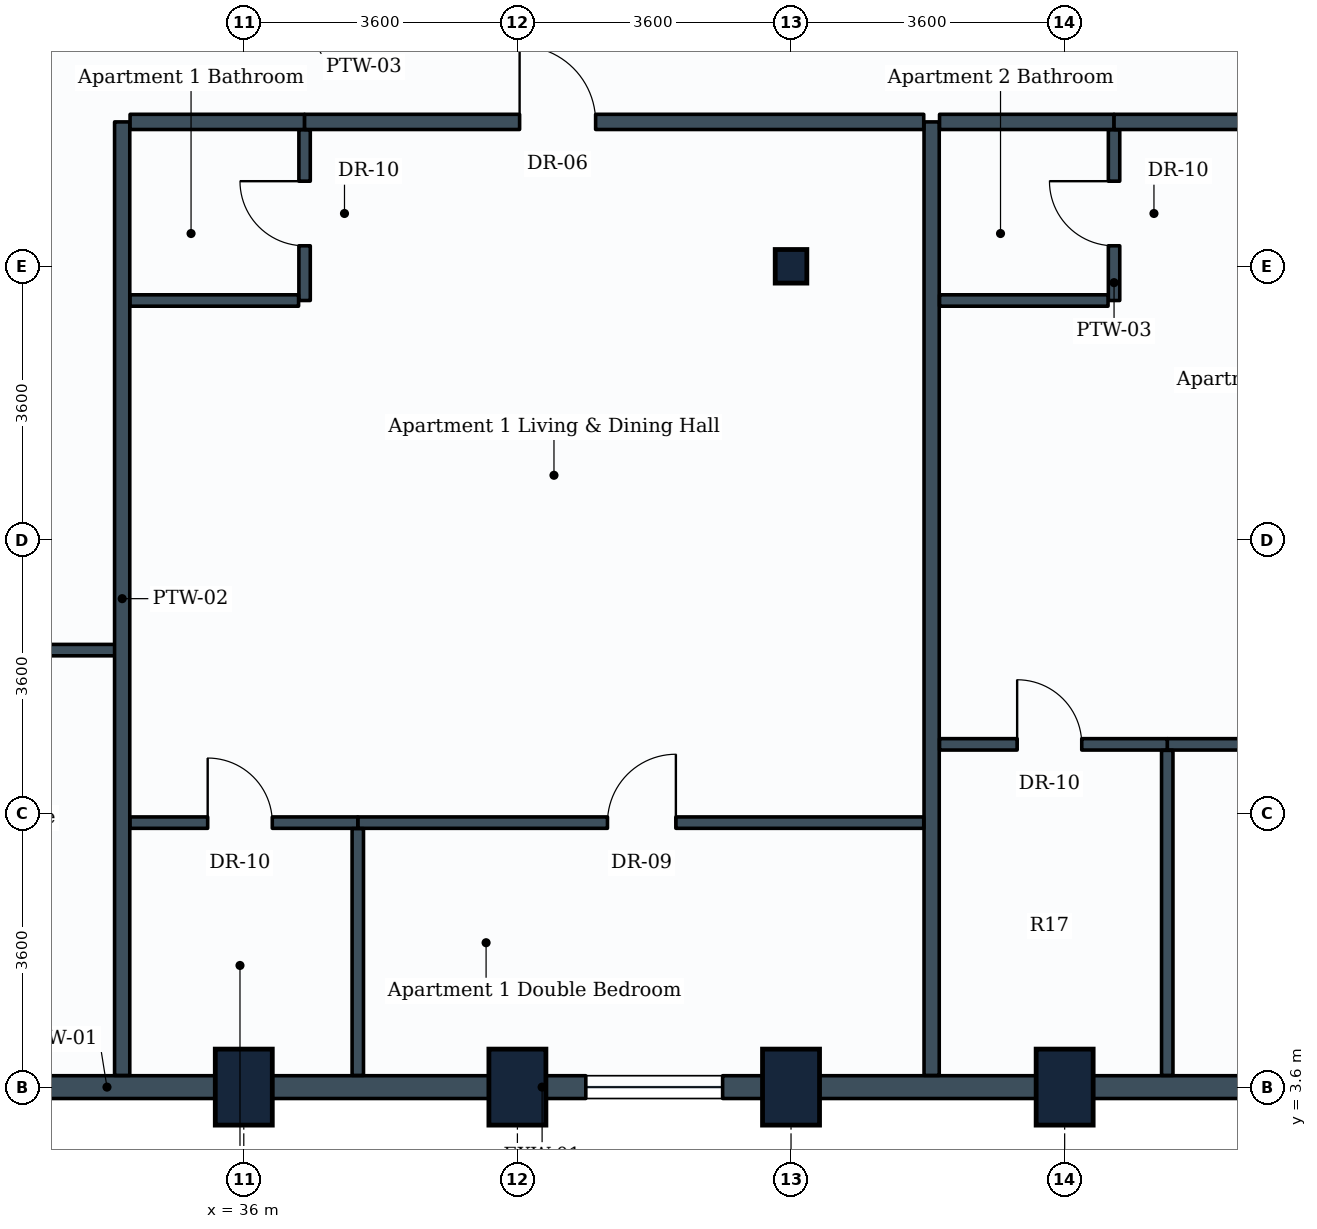
"""IFC4 building model, lengths in metres.
Left out: names, types, materials, properties, quantities, classifications, styles, units other than length and angle.
Written with IfcOpenShell. Run it as: python <this file> out.ifc"""

import sys

from ifc_helpers import new_model, si_unit, direction, frame, frame_2d, origin, origin_2d, place, context, subcontext, project, spatial, rectangle, i_section, extrude, element, fill, save


model = new_model("IFC4")
c1 = context("Model", 3, precision=1e-05, world=origin(), true_north=direction((0.0, 1.0)))
c2 = subcontext(c1, "Body", "Model", "MODEL_VIEW")
j1 = project(units=[si_unit("LENGTHUNIT", "METRE"), si_unit("PLANEANGLEUNIT", "RADIAN")], contexts=[c1])
p1 = place(None, origin())
s1 = spatial("IfcSite", under=j1, at=p1, CompositionType="ELEMENT")
p2 = place(p1, origin())
s2 = spatial("IfcBuilding", under=s1, at=p2, CompositionType="ELEMENT")
p3 = place(p2, frame((0.0, 0.0, 158.0)))
s3 = spatial("IfcBuildingStorey", under=s2, at=p3, CompositionType="ELEMENT", Elevation=158.0)
for number, where, z_axis, x_axis in (
    (1, (36.0, 3.6, 0.0), (0.0, 0.0, 1.0), (1.0, 0.0, 0.0)),
    (2, (39.6, 3.6, 0.0), (0.0, 0.0, 1.0), (1.0, 0.0, 0.0)),
    (3, (43.2, 3.6, 0.0), (0.0, 0.0, 1.0), (1.0, 0.0, 0.0)),
):
    element("IfcColumn", number, at=place(p3, frame(where, z_axis=z_axis, x_axis=x_axis)), inside=s3, PredefinedType="COLUMN", context=c2, shape_type="SweptSolid", body=[
        extrude(rectangle(XDim=0.75, YDim=1.0, at=origin_2d()), origin(), (0.0, 0.0, 1.0), 3.8),
    ])
p4 = place(p3, frame((43.2, 14.4, 0.0), z_axis=(0.0, 0.0, 1.0), x_axis=(1.0, 0.0, 0.0)))
e4 = element("IfcColumn", 4, at=p4, inside=s3, PredefinedType="COLUMN", context=c2, shape_type="SweptSolid", body=[
    extrude(i_section(OverallWidth=0.416, OverallDepth=0.442, WebThickness=0.025, FlangeThickness=0.041, FilletRadius=0.015, at=origin_2d()), origin(), (0.0, 0.0, 1.0), 3.8),
])
p5 = place(p3, frame((46.8, 3.6, 0.0), z_axis=(0.0, 0.0, 1.0), x_axis=(1.0, 0.0, 0.0)))
e5 = element("IfcColumn", 5, at=p5, inside=s3, PredefinedType="COLUMN", context=c2, shape_type="SweptSolid", body=[
    extrude(rectangle(XDim=0.75, YDim=1.0, at=origin_2d()), origin(), (0.0, 0.0, 1.0), 3.8),
])
for number, where, z_axis, x_axis in (
    (6, (36.0, 3.6, 0.0), (0.0, 0.0, 1.0), (-1.0, 0.0, 0.0)),
    (7, (39.6, 3.6, 0.0), (0.0, 0.0, 1.0), (-1.0, 0.0, 0.0)),
):
    element("IfcWall", number, at=place(p3, frame(where, z_axis=z_axis, x_axis=x_axis)), inside=s3, PredefinedType="STANDARD", context=c2, shape_type="SweptSolid", body=[
        extrude(rectangle(XDim=3.6, YDim=0.3, at=frame_2d((1.8, 0.0))), origin(), (0.0, 0.0, 1.0), 2.93),
    ])
p6 = place(p3, frame((43.2, 3.6, 0.0), z_axis=(0.0, 0.0, 1.0), x_axis=(-1.0, 0.0, 0.0)))
e8 = element("IfcWall", 8, at=p6, inside=s3, PredefinedType="STANDARD", context=c2, shape_type="SweptSolid", body=[
    extrude(rectangle(XDim=3.6, YDim=0.3, at=frame_2d((1.8, 0.0))), origin(), (0.0, 0.0, 1.0), 2.93),
])
p7 = place(p6, frame((0.9, 0.0, 0.85)))
e9 = element("IfcOpeningElement", 9, at=p7, cuts=e8, PredefinedType="OPENING", context=c2, shape_type="SweptSolid", body=[
    extrude(rectangle(XDim=1.8, YDim=1.35, at=frame_2d((0.9, 0.675))), frame((0.0, 0.16, 0.0), z_axis=(0.0, -1.0, 0.0), x_axis=(1.0, 0.0, 0.0)), (0.0, 0.0, 1.0), 0.32),
])
p8 = place(p3, frame((46.8, 3.6, 0.0), z_axis=(0.0, 0.0, 1.0), x_axis=(-1.0, 0.0, 0.0)))
e10 = element("IfcWall", 10, at=p8, inside=s3, PredefinedType="STANDARD", context=c2, shape_type="SweptSolid", body=[
    extrude(rectangle(XDim=3.6, YDim=0.3, at=frame_2d((1.8, 0.0))), origin(), (0.0, 0.0, 1.0), 2.93),
])
p9 = place(p3, frame((50.4, 3.6, 0.0), z_axis=(0.0, 0.0, 1.0), x_axis=(-1.0, 0.0, 0.0)))
e11 = element("IfcWall", 11, at=p9, inside=s3, PredefinedType="STANDARD", context=c2, shape_type="SweptSolid", body=[
    extrude(rectangle(XDim=3.6, YDim=0.3, at=frame_2d((1.8, 0.0))), origin(), (0.0, 0.0, 1.0), 2.93),
])
p10 = place(p3, frame((28.879, 9.35, 0.0), z_axis=(0.0, 0.0, 1.0), x_axis=(1.0, 0.0, 0.0)))
e12 = element("IfcWall", 12, at=p10, inside=s3, PredefinedType="PARTITIONING", context=c2, shape_type="SweptSolid", body=[
    extrude(rectangle(XDim=5.521, YDim=0.15, at=frame_2d((2.76, 0.0))), origin(), (0.0, 0.0, 1.0), 3.535),
])
p11 = place(p10, frame((0.36, 0.0, 0.0)))
e13 = element("IfcOpeningElement", 13, at=p11, cuts=e12, PredefinedType="OPENING", context=c2, shape_type="SweptSolid", body=[
    extrude(rectangle(XDim=1.0, YDim=2.1, at=frame_2d((0.5, 1.05))), frame((0.0, 0.085, 0.0), z_axis=(0.0, -1.0, 0.0), x_axis=(1.0, 0.0, 0.0)), (0.0, 0.0, 1.0), 0.17),
])
for number, where, z_axis, x_axis in (
    (14, (34.4, 3.754, 0.0), (0.0, 0.0, 1.0), (0.0, 1.0, 0.0)),
    (15, (45.05, 3.754, 0.0), (0.0, 0.0, 1.0), (0.0, 1.0, 0.0)),
):
    element("IfcWall", number, at=place(p3, frame(where, z_axis=z_axis, x_axis=x_axis)), inside=s3, PredefinedType="PARTITIONING", context=c2, shape_type="SweptSolid", body=[
        extrude(rectangle(XDim=12.546, YDim=0.2, at=frame_2d((6.273, 0.0))), origin(), (0.0, 0.0, 1.0), 2.93),
    ])
p12 = place(p3, frame((34.504, 16.3, 0.0), z_axis=(0.0, 0.0, 1.0), x_axis=(1.0, 0.0, 0.0)))
e16 = element("IfcWall", 16, at=p12, inside=s3, PredefinedType="PARTITIONING", context=c2, shape_type="SweptSolid", body=[
    extrude(rectangle(XDim=2.296, YDim=0.2, at=frame_2d((1.148, 0.0))), origin(), (0.0, 0.0, 1.0), 3.22),
])
p13 = place(p3, frame((36.8, 13.95, 0.0), z_axis=(0.0, 0.0, 1.0), x_axis=(0.0, 1.0, 0.0)))
e17 = element("IfcWall", 17, at=p13, inside=s3, PredefinedType="PARTITIONING", context=c2, shape_type="SweptSolid", body=[
    extrude(rectangle(XDim=2.246, YDim=0.15, at=frame_2d((1.123, 0.0))), origin(), (0.0, 0.0, 1.0), 3.17),
])
p14 = place(p13, frame((0.72, 0.0, 0.0)))
e18 = element("IfcOpeningElement", 18, at=p14, cuts=e17, PredefinedType="OPENING", context=c2, shape_type="SweptSolid", body=[
    extrude(rectangle(XDim=0.85, YDim=2.1, at=frame_2d((0.425, 1.05))), frame((0.0, 0.085, 0.0), z_axis=(0.0, -1.0, 0.0), x_axis=(1.0, 0.0, 0.0)), (0.0, 0.0, 1.0), 0.17),
])
p15 = place(p3, frame((34.504, 13.95, 0.0), z_axis=(0.0, 0.0, 1.0), x_axis=(1.0, 0.0, 0.0)))
e19 = element("IfcWall", 19, at=p15, inside=s3, PredefinedType="PARTITIONING", context=c2, shape_type="SweptSolid", body=[
    extrude(rectangle(XDim=2.217, YDim=0.15, at=frame_2d((1.108, 0.0))), origin(), (0.0, 0.0, 1.0), 3.22),
])
p16 = place(p3, frame((36.8, 16.3, 0.0), z_axis=(0.0, 0.0, 1.0), x_axis=(1.0, 0.0, 0.0)))
e20 = element("IfcWall", 20, at=p16, inside=s3, PredefinedType="PARTITIONING", context=c2, shape_type="SweptSolid", body=[
    extrude(rectangle(XDim=8.146, YDim=0.2, at=frame_2d((4.073, 0.0))), origin(), (0.0, 0.0, 1.0), 3.17),
])
p17 = place(p16, frame((2.829, 0.0, 0.0)))
e21 = element("IfcOpeningElement", 21, at=p17, cuts=e20, PredefinedType="OPENING", context=c2, shape_type="SweptSolid", body=[
    extrude(rectangle(XDim=1.0, YDim=2.1, at=frame_2d((0.5, 1.05))), frame((0.0, 0.11, 0.0), z_axis=(0.0, -1.0, 0.0), x_axis=(1.0, 0.0, 0.0)), (0.0, 0.0, 1.0), 0.22),
])
p18 = place(p3, frame((37.5, 7.08, 0.0), z_axis=(0.0, 0.0, 1.0), x_axis=(1.0, 0.0, 0.0)))
e22 = element("IfcWall", 22, at=p18, inside=s3, PredefinedType="PARTITIONING", context=c2, shape_type="SweptSolid", body=[
    extrude(rectangle(XDim=7.446, YDim=0.15, at=frame_2d((3.723, 0.0))), origin(), (0.0, 0.0, 1.0), 3.17),
])
p19 = place(p18, frame((3.285, 0.0, 0.0)))
e23 = element("IfcOpeningElement", 23, at=p19, cuts=e22, PredefinedType="OPENING", context=c2, shape_type="SweptSolid", body=[
    extrude(rectangle(XDim=0.9, YDim=2.1, at=frame_2d((0.45, 1.05))), frame((0.0, 0.085, 0.0), z_axis=(0.0, -1.0, 0.0), x_axis=(1.0, 0.0, 0.0)), (0.0, 0.0, 1.0), 0.17),
])
p20 = place(p3, frame((34.504, 7.08, 0.0), z_axis=(0.0, 0.0, 1.0), x_axis=(1.0, 0.0, 0.0)))
e24 = element("IfcWall", 24, at=p20, inside=s3, PredefinedType="PARTITIONING", context=c2, shape_type="SweptSolid", body=[
    extrude(rectangle(XDim=2.996, YDim=0.15, at=frame_2d((1.498, 0.0))), origin(), (0.0, 0.0, 1.0), 3.17),
])
p21 = place(p20, frame((1.021, 0.0, 0.0)))
e25 = element("IfcOpeningElement", 25, at=p21, cuts=e24, PredefinedType="OPENING", context=c2, shape_type="SweptSolid", body=[
    extrude(rectangle(XDim=0.85, YDim=2.1, at=frame_2d((0.425, 1.05))), frame((0.0, 0.085, 0.0), z_axis=(0.0, -1.0, 0.0), x_axis=(1.0, 0.0, 0.0)), (0.0, 0.0, 1.0), 0.17),
])
p22 = place(p3, frame((37.5, 3.754, 0.0), z_axis=(0.0, 0.0, 1.0), x_axis=(0.0, 1.0, 0.0)))
e26 = element("IfcWall", 26, at=p22, inside=s3, PredefinedType="PARTITIONING", context=c2, shape_type="SweptSolid", body=[
    extrude(rectangle(XDim=3.247, YDim=0.15, at=frame_2d((1.624, 0.0))), origin(), (0.0, 0.0, 1.0), 2.93),
])
p23 = place(p3, frame((45.154, 16.3, 0.0), z_axis=(0.0, 0.0, 1.0), x_axis=(1.0, 0.0, 0.0)))
e27 = element("IfcWall", 27, at=p23, inside=s3, PredefinedType="PARTITIONING", context=c2, shape_type="SweptSolid", body=[
    extrude(rectangle(XDim=2.296, YDim=0.2, at=frame_2d((1.148, 0.0))), origin(), (0.0, 0.0, 1.0), 3.17),
])
p24 = place(p3, frame((47.45, 13.95, 0.0), z_axis=(0.0, 0.0, 1.0), x_axis=(0.0, 1.0, 0.0)))
e28 = element("IfcWall", 28, at=p24, inside=s3, PredefinedType="PARTITIONING", context=c2, shape_type="SweptSolid", body=[
    extrude(rectangle(XDim=2.246, YDim=0.15, at=frame_2d((1.123, 0.0))), origin(), (0.0, 0.0, 1.0), 3.17),
])
p25 = place(p24, frame((0.72, 0.0, 0.0)))
e29 = element("IfcOpeningElement", 29, at=p25, cuts=e28, PredefinedType="OPENING", context=c2, shape_type="SweptSolid", body=[
    extrude(rectangle(XDim=0.85, YDim=2.1, at=frame_2d((0.425, 1.05))), frame((0.0, 0.085, 0.0), z_axis=(0.0, -1.0, 0.0), x_axis=(1.0, 0.0, 0.0)), (0.0, 0.0, 1.0), 0.17),
])
p26 = place(p3, frame((45.154, 13.95, 0.0), z_axis=(0.0, 0.0, 1.0), x_axis=(1.0, 0.0, 0.0)))
e30 = element("IfcWall", 30, at=p26, inside=s3, PredefinedType="PARTITIONING", context=c2, shape_type="SweptSolid", body=[
    extrude(rectangle(XDim=2.217, YDim=0.15, at=frame_2d((1.108, 0.0))), origin(), (0.0, 0.0, 1.0), 3.17),
])
p27 = place(p3, frame((47.45, 16.3, 0.0), z_axis=(0.0, 0.0, 1.0), x_axis=(1.0, 0.0, 0.0)))
e31 = element("IfcWall", 31, at=p27, inside=s3, PredefinedType="PARTITIONING", context=c2, shape_type="SweptSolid", body=[
    extrude(rectangle(XDim=6.396, YDim=0.2, at=frame_2d((3.198, 0.0))), origin(), (0.0, 0.0, 1.0), 2.93),
])
p28 = place(p27, frame((2.735, 0.0, 0.0)))
e32 = element("IfcOpeningElement", 32, at=p28, cuts=e31, PredefinedType="OPENING", context=c2, shape_type="SweptSolid", body=[
    extrude(rectangle(XDim=1.0, YDim=2.1, at=frame_2d((0.5, 1.05))), frame((0.0, 0.11, 0.0), z_axis=(0.0, -1.0, 0.0), x_axis=(1.0, 0.0, 0.0)), (0.0, 0.0, 1.0), 0.22),
])
p29 = place(p3, frame((48.15, 8.11, 0.0), z_axis=(0.0, 0.0, 1.0), x_axis=(1.0, 0.0, 0.0)))
e33 = element("IfcWall", 33, at=p29, inside=s3, PredefinedType="PARTITIONING", context=c2, shape_type="SweptSolid", body=[
    extrude(rectangle(XDim=5.696, YDim=0.15, at=frame_2d((2.848, 0.0))), origin(), (0.0, 0.0, 1.0), 2.93),
])
p30 = place(p29, frame((1.797, 0.0, 0.0)))
e34 = element("IfcOpeningElement", 34, at=p30, cuts=e33, PredefinedType="OPENING", context=c2, shape_type="SweptSolid", body=[
    extrude(rectangle(XDim=0.9, YDim=2.1, at=frame_2d((0.45, 1.05))), frame((0.0, 0.085, 0.0), z_axis=(0.0, -1.0, 0.0), x_axis=(1.0, 0.0, 0.0)), (0.0, 0.0, 1.0), 0.17),
])
p31 = place(p3, frame((45.154, 8.11, 0.0), z_axis=(0.0, 0.0, 1.0), x_axis=(1.0, 0.0, 0.0)))
e35 = element("IfcWall", 35, at=p31, inside=s3, PredefinedType="PARTITIONING", context=c2, shape_type="SweptSolid", body=[
    extrude(rectangle(XDim=2.996, YDim=0.15, at=frame_2d((1.498, 0.0))), origin(), (0.0, 0.0, 1.0), 3.17),
])
p32 = place(p31, frame((1.021, 0.0, 0.0)))
e36 = element("IfcOpeningElement", 36, at=p32, cuts=e35, PredefinedType="OPENING", context=c2, shape_type="SweptSolid", body=[
    extrude(rectangle(XDim=0.85, YDim=2.1, at=frame_2d((0.425, 1.05))), frame((0.0, 0.085, 0.0), z_axis=(0.0, -1.0, 0.0), x_axis=(1.0, 0.0, 0.0)), (0.0, 0.0, 1.0), 0.17),
])
p33 = place(p3, frame((48.15, 3.754, 0.0), z_axis=(0.0, 0.0, 1.0), x_axis=(0.0, 1.0, 0.0)))
e37 = element("IfcWall", 37, at=p33, inside=s3, PredefinedType="PARTITIONING", context=c2, shape_type="SweptSolid", body=[
    extrude(rectangle(XDim=4.277, YDim=0.15, at=frame_2d((2.139, 0.0))), origin(), (0.0, 0.0, 1.0), 2.93),
])
p34 = place(p7, origin())
e38 = element("IfcWindow", 38, at=p34, inside=s3, PartitioningType="SINGLE_PANEL", PredefinedType="WINDOW", context=c2, shape_type="SweptSolid", body=[
    extrude(rectangle(XDim=1.8, YDim=1.35, at=frame_2d((0.9, 0.675))), frame((0.0, 0.03, 0.0), z_axis=(0.0, -1.0, 0.0), x_axis=(1.0, 0.0, 0.0)), (0.0, 0.0, 1.0), 0.06),
])
fill(e9, e38)
p35 = place(p14, origin())
e39 = element("IfcDoor", 39, at=p35, inside=s3, OperationType="SINGLE_SWING_RIGHT", PredefinedType="DOOR", context=c2, shape_type="SweptSolid", body=[
    extrude(rectangle(XDim=0.85, YDim=2.1, at=frame_2d((0.425, 1.05))), frame((0.0, 0.025, 0.0), z_axis=(0.0, -1.0, 0.0), x_axis=(1.0, 0.0, 0.0)), (0.0, 0.0, 1.0), 0.05),
])
fill(e18, e39)
p36 = place(p17, origin())
e40 = element("IfcDoor", 40, at=p36, inside=s3, OperationType="SINGLE_SWING_LEFT", PredefinedType="DOOR", context=c2, shape_type="SweptSolid", body=[
    extrude(rectangle(XDim=1.0, YDim=2.1, at=frame_2d((0.5, 1.05))), frame((0.0, 0.025, 0.0), z_axis=(0.0, -1.0, 0.0), x_axis=(1.0, 0.0, 0.0)), (0.0, 0.0, 1.0), 0.05),
])
fill(e21, e40)
p37 = place(p19, origin())
e41 = element("IfcDoor", 41, at=p37, inside=s3, OperationType="SINGLE_SWING_RIGHT", PredefinedType="DOOR", context=c2, shape_type="SweptSolid", body=[
    extrude(rectangle(XDim=0.9, YDim=2.1, at=frame_2d((0.45, 1.05))), frame((0.0, 0.025, 0.0), z_axis=(0.0, -1.0, 0.0), x_axis=(1.0, 0.0, 0.0)), (0.0, 0.0, 1.0), 0.05),
])
fill(e23, e41)
p38 = place(p21, origin())
e42 = element("IfcDoor", 42, at=p38, inside=s3, OperationType="SINGLE_SWING_LEFT", PredefinedType="DOOR", context=c2, shape_type="SweptSolid", body=[
    extrude(rectangle(XDim=0.85, YDim=2.1, at=frame_2d((0.425, 1.05))), frame((0.0, 0.025, 0.0), z_axis=(0.0, -1.0, 0.0), x_axis=(1.0, 0.0, 0.0)), (0.0, 0.0, 1.0), 0.05),
])
fill(e25, e42)
p39 = place(p25, origin())
e43 = element("IfcDoor", 43, at=p39, inside=s3, OperationType="SINGLE_SWING_RIGHT", PredefinedType="DOOR", context=c2, shape_type="SweptSolid", body=[
    extrude(rectangle(XDim=0.85, YDim=2.1, at=frame_2d((0.425, 1.05))), frame((0.0, 0.025, 0.0), z_axis=(0.0, -1.0, 0.0), x_axis=(1.0, 0.0, 0.0)), (0.0, 0.0, 1.0), 0.05),
])
fill(e29, e43)
p40 = place(p32, origin())
e44 = element("IfcDoor", 44, at=p40, inside=s3, OperationType="SINGLE_SWING_LEFT", PredefinedType="DOOR", context=c2, shape_type="SweptSolid", body=[
    extrude(rectangle(XDim=0.85, YDim=2.1, at=frame_2d((0.425, 1.05))), frame((0.0, 0.025, 0.0), z_axis=(0.0, -1.0, 0.0), x_axis=(1.0, 0.0, 0.0)), (0.0, 0.0, 1.0), 0.05),
])
fill(e36, e44)
save(model, sys.argv[1])
